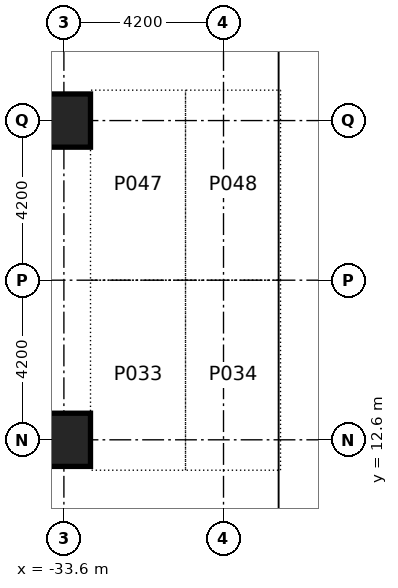
"""IFC4 building model, lengths in metres.
Left out: names, types, materials, properties, quantities, classifications, styles, units other than length and angle.
Written with IfcOpenShell. Run it as: python <this file> out.ifc"""

import sys

from ifc_helpers import new_model, si_unit, direction, frame, origin, origin_2d, place, context, subcontext, project, spatial, rectangle, extrude, element, save


model = new_model("IFC4")
c1 = context("Model", 3, precision=1e-05, world=origin(), true_north=direction((0.0, 1.0)))
c2 = subcontext(c1, "Body", "Model", "MODEL_VIEW")
j1 = project(units=[si_unit("LENGTHUNIT", "METRE"), si_unit("PLANEANGLEUNIT", "RADIAN")], contexts=[c1])
p1 = place(None, origin())
s1 = spatial("IfcSite", under=j1, at=p1, CompositionType="ELEMENT")
p2 = place(p1, origin())
s2 = spatial("IfcBuilding", under=s1, at=p2, CompositionType="ELEMENT")
p3 = place(p2, frame((0.0, 0.0, -8.4)))
s3 = spatial("IfcBuildingStorey", under=s2, at=p3, CompositionType="ELEMENT", Elevation=-8.4)
for number, where, z_axis, x_axis in (
    (1, (-33.6, 12.6, -0.5), (0.0, 0.0, 1.0), (1.0, 0.0, 0.0)),
    (2, (-33.6, 21.0, -0.5), (0.0, 0.0, 1.0), (1.0, 0.0, 0.0)),
):
    element("IfcColumn", number, at=place(p3, frame(where, z_axis=z_axis, x_axis=x_axis)), inside=s3, PredefinedType="COLUMN", context=c2, shape_type="SweptSolid", body=[
        extrude(rectangle(XDim=1.4, YDim=1.4, at=origin_2d()), origin(), (0.0, 0.0, 1.0), 4.7),
    ])
save(model, sys.argv[1])
